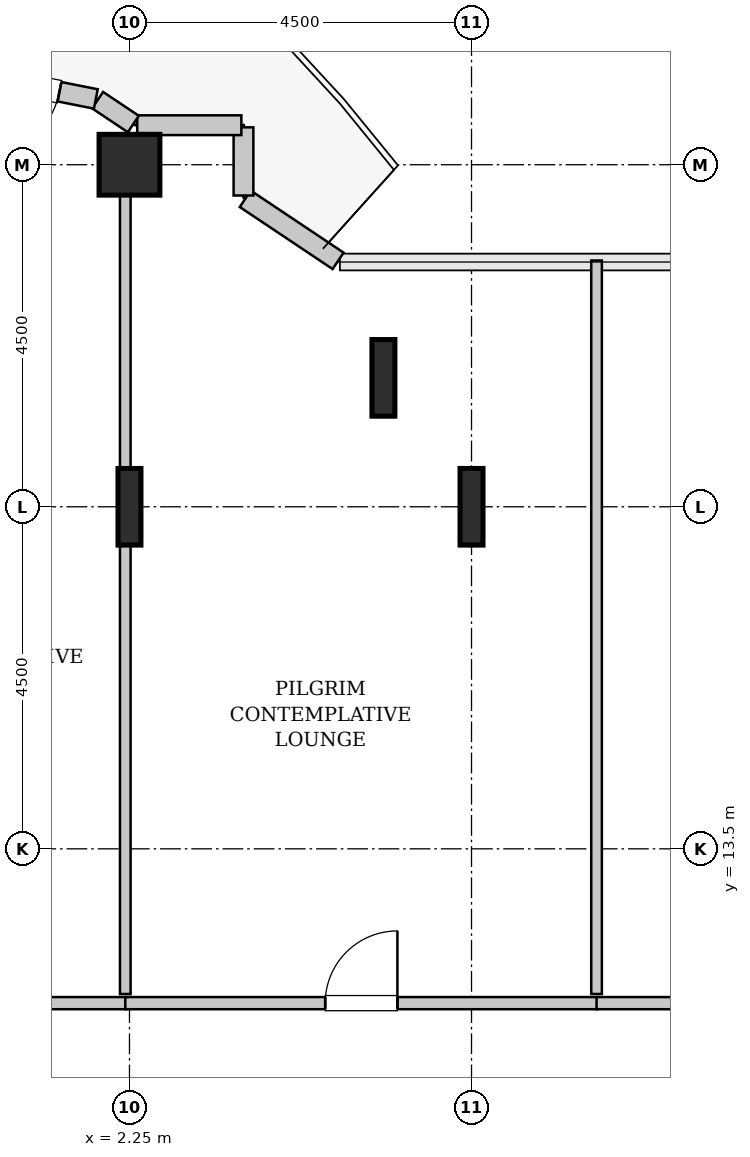
"""IFC4 building model, lengths in metres.
Left out: names, types, materials, properties, quantities, classifications, styles, units other than length and angle.
Written with IfcOpenShell. Run it as: python <this file> out.ifc"""

import sys

from ifc_helpers import new_model, si_unit, direction, frame, frame_2d, origin, origin_2d, place, context, subcontext, project, spatial, rectangle, hollow_rectangle, i_section, extrude, source, transform, mapped, element, fill, save


model = new_model("IFC4")
c1 = context("Model", 3, precision=1e-05, world=origin(), true_north=direction((0.0, 1.0)))
c2 = subcontext(c1, "Body", "Model", "MODEL_VIEW")
j1 = project(units=[si_unit("LENGTHUNIT", "METRE"), si_unit("PLANEANGLEUNIT", "RADIAN")], contexts=[c1])
p1 = place(None, origin())
s1 = spatial("IfcSite", under=j1, at=p1, CompositionType="ELEMENT")
p2 = place(p1, origin())
s2 = spatial("IfcBuilding", under=s1, at=p2, CompositionType="ELEMENT")
p3 = place(p2, frame((0.0, 0.0, 125.0)))
s3 = spatial("IfcBuildingStorey", under=s2, at=p3, CompositionType="ELEMENT", Elevation=125.0)
m1 = source(origin(), c2, "Body", "SweptSolid", [
    extrude(i_section(OverallWidth=0.302, OverallDepth=1.008, WebThickness=0.021, FlangeThickness=0.04, FilletRadius=0.03, at=origin_2d()), origin(), (0.0, 0.0, 1.0), 3.8),
])
p4 = place(p3, frame((2.25, 18.0, 0.0), z_axis=(0.0, 0.0, 1.0), x_axis=(1.0, 0.0, 0.0)))
e1 = element("IfcColumn", 1, at=p4, inside=s3, PredefinedType="COLUMN", context=c2, shape_type="MappedRepresentation", body=[
    mapped(m1, transform((0.0, 0.0, 0.0), x_axis=(1.0, 0.0, 0.0), y_axis=(0.0, 1.0, 0.0), z_axis=(0.0, 0.0, 1.0), scale=1.0)),
])
m2 = source(origin(), c2, "Body", "SweptSolid", [
    extrude(hollow_rectangle(XDim=0.8, YDim=0.8, WallThickness=0.04, InnerFilletRadius=0.04, OuterFilletRadius=0.08, at=origin_2d()), origin(), (0.0, 0.0, 1.0), 3.8),
])
p5 = place(p3, frame((2.25, 22.5, 0.0), z_axis=(0.0, 0.0, 1.0), x_axis=(1.0, 0.0, 0.0)))
e2 = element("IfcColumn", 2, at=p5, inside=s3, PredefinedType="COLUMN", context=c2, shape_type="MappedRepresentation", body=[
    mapped(m2, transform((0.0, 0.0, 0.0), x_axis=(1.0, 0.0, 0.0), y_axis=(0.0, 1.0, 0.0), z_axis=(0.0, 0.0, 1.0), scale=1.0)),
])
for number, where, z_axis, x_axis in (
    (3, (5.591, 19.696, 0.0), (0.0, 0.0, 1.0), (1.0, 0.0, 0.0)),
    (4, (6.75, 18.0, 0.0), (0.0, 0.0, 1.0), (1.0, 0.0, 0.0)),
):
    element("IfcColumn", number, at=place(p3, frame(where, z_axis=z_axis, x_axis=x_axis)), inside=s3, PredefinedType="COLUMN", context=c2, shape_type="MappedRepresentation", body=[
        mapped(m1, transform((0.0, 0.0, 0.0), x_axis=(1.0, 0.0, 0.0), y_axis=(0.0, 1.0, 0.0), z_axis=(0.0, 0.0, 1.0), scale=1.0)),
    ])
m3 = source(origin(), c2, "Body", "SweptSolid", [
    extrude(rectangle(XDim=1.469, YDim=0.26, at=frame_2d((0.734, 0.0))), origin(), (0.0, 0.0, 1.0), 3.55),
])
p6 = place(p3, frame((4.995, 21.236, 0.0), z_axis=(0.0, 0.0, 1.0), x_axis=(-0.831461760506, 0.555581983884, 0.0)))
e5 = element("IfcWall", 5, at=p6, inside=s3, PredefinedType="SOLIDWALL", context=c2, shape_type="MappedRepresentation", body=[
    mapped(m3, transform((0.0, 0.0, 0.0), x_axis=(1.0, 0.0, 0.0), y_axis=(0.0, 1.0, 0.0), z_axis=(0.0, 0.0, 1.0), scale=1.0)),
])
m4 = source(origin(), c2, "Body", "SweptSolid", [
    extrude(rectangle(XDim=0.897, YDim=0.26, at=frame_2d((0.448, 0.0))), origin(), (0.0, 0.0, 1.0), 3.55),
])
p7 = place(p3, frame((3.75, 22.095, 0.0), z_axis=(0.0, 0.0, 1.0), x_axis=(0.0, 1.0, 0.0)))
e6 = element("IfcWall", 6, at=p7, inside=s3, PredefinedType="SOLIDWALL", context=c2, shape_type="MappedRepresentation", body=[
    mapped(m4, transform((0.0, 0.0, 0.0), x_axis=(1.0, 0.0, 0.0), y_axis=(0.0, 1.0, 0.0), z_axis=(0.0, 0.0, 1.0), scale=1.0)),
])
m5 = source(origin(), c2, "Body", "SweptSolid", [
    extrude(rectangle(XDim=1.37, YDim=0.26, at=frame_2d((0.685, 0.0))), origin(), (0.0, 0.0, 1.0), 3.55),
])
p8 = place(p3, frame((3.722, 23.02, 0.0), z_axis=(0.0, 0.0, 1.0), x_axis=(-1.0, 0.0, 0.0)))
e7 = element("IfcWall", 7, at=p8, inside=s3, PredefinedType="SOLIDWALL", context=c2, shape_type="MappedRepresentation", body=[
    mapped(m5, transform((0.0, 0.0, 0.0), x_axis=(1.0, 0.0, 0.0), y_axis=(0.0, 1.0, 0.0), z_axis=(0.0, 0.0, 1.0), scale=1.0)),
])
m6 = source(origin(), c2, "Body", "SweptSolid", [
    extrude(rectangle(XDim=0.565, YDim=0.26, at=frame_2d((0.283, 0.0))), origin(), (0.0, 0.0, 1.0), 3.55),
])
p9 = place(p3, frame((2.301, 23.036, 0.0), z_axis=(0.0, 0.0, 1.0), x_axis=(-0.831651492666, 0.555297933317, 0.0)))
e8 = element("IfcWall", 8, at=p9, inside=s3, PredefinedType="SOLIDWALL", context=c2, shape_type="MappedRepresentation", body=[
    mapped(m6, transform((0.0, 0.0, 0.0), x_axis=(1.0, 0.0, 0.0), y_axis=(0.0, 1.0, 0.0), z_axis=(0.0, 0.0, 1.0), scale=1.0)),
])
m7 = source(origin(), c2, "Body", "SweptSolid", [
    extrude(rectangle(XDim=4.137, YDim=0.26, at=frame_2d((2.068, 0.0))), origin(), (0.0, 0.0, 1.0), 3.55),
])
p10 = place(p3, frame((1.807, 23.365, 0.0), z_axis=(0.0, 0.0, 1.0), x_axis=(-0.980782170794, 0.195105954428, 0.0)))
e9 = element("IfcWall", 9, at=p10, inside=s3, PredefinedType="SOLIDWALL", context=c2, shape_type="MappedRepresentation", body=[
    mapped(m7, transform((0.0, 0.0, 0.0), x_axis=(1.0, 0.0, 0.0), y_axis=(0.0, 1.0, 0.0), z_axis=(0.0, 0.0, 1.0), scale=1.0)),
])
p11 = place(p10, frame((0.488, 0.0, 0.0)))
e10 = element("IfcOpeningElement", 10, at=p11, cuts=e9, PredefinedType="OPENING", context=c2, shape_type="SweptSolid", body=[
    extrude(rectangle(XDim=1.1, YDim=2.2, at=frame_2d((0.55, 1.1))), frame((0.0, 0.14, 0.0), z_axis=(0.0, -1.0, 0.0), x_axis=(1.0, 0.0, 0.0)), (0.0, 0.0, 1.0), 0.28),
])
m8 = source(origin(), c2, "Body", "SweptSolid", [
    extrude(rectangle(XDim=3.605, YDim=0.16, at=frame_2d((1.802, 0.0))), origin(), (0.0, 0.0, 1.0), 3.535),
])
p12 = place(p3, frame((-1.4, 11.47, 0.0), z_axis=(0.0, 0.0, 1.0), x_axis=(1.0, 0.0, 0.0)))
e11 = element("IfcWall", 11, at=p12, inside=s3, PredefinedType="PARTITIONING", context=c2, shape_type="MappedRepresentation", body=[
    mapped(m8, transform((0.0, 0.0, 0.0), x_axis=(1.0, 0.0, 0.0), y_axis=(0.0, 1.0, 0.0), z_axis=(0.0, 0.0, 1.0), scale=1.0)),
])
p13 = place(p12, frame((1.327, 0.0, 0.0)))
e12 = element("IfcOpeningElement", 12, at=p13, cuts=e11, PredefinedType="OPENING", context=c2, shape_type="SweptSolid", body=[
    extrude(rectangle(XDim=0.95, YDim=2.1, at=frame_2d((0.475, 1.05))), frame((0.0, 0.09, 0.0), z_axis=(0.0, -1.0, 0.0), x_axis=(1.0, 0.0, 0.0)), (0.0, 0.0, 1.0), 0.18),
])
m9 = source(origin(), c2, "Body", "SweptSolid", [
    extrude(rectangle(XDim=11.314, YDim=0.14, at=frame_2d((5.657, 0.0))), origin(), (0.0, 0.0, 1.0), 2.875),
])
p14 = place(p3, frame((2.195, 11.59, 0.0), z_axis=(0.0, 0.0, 1.0), x_axis=(0.0, 1.0, 0.0)))
e13 = element("IfcWall", 13, at=p14, inside=s3, PredefinedType="PARTITIONING", context=c2, shape_type="MappedRepresentation", body=[
    mapped(m9, transform((0.0, 0.0, 0.0), x_axis=(1.0, 0.0, 0.0), y_axis=(0.0, 1.0, 0.0), z_axis=(0.0, 0.0, 1.0), scale=1.0)),
])
m10 = source(origin(), c2, "Body", "SweptSolid", [
    extrude(rectangle(XDim=6.21, YDim=0.16, at=frame_2d((3.105, 0.0))), origin(), (0.0, 0.0, 1.0), 3.535),
])
p15 = place(p3, frame((2.195, 11.47, 0.0), z_axis=(0.0, 0.0, 1.0), x_axis=(1.0, 0.0, 0.0)))
e14 = element("IfcWall", 14, at=p15, inside=s3, PredefinedType="PARTITIONING", context=c2, shape_type="MappedRepresentation", body=[
    mapped(m10, transform((0.0, 0.0, 0.0), x_axis=(1.0, 0.0, 0.0), y_axis=(0.0, 1.0, 0.0), z_axis=(0.0, 0.0, 1.0), scale=1.0)),
])
p16 = place(p15, frame((2.63, 0.0, 0.0)))
e15 = element("IfcOpeningElement", 15, at=p16, cuts=e14, PredefinedType="OPENING", context=c2, shape_type="SweptSolid", body=[
    extrude(rectangle(XDim=0.95, YDim=2.1, at=frame_2d((0.475, 1.05))), frame((0.0, 0.09, 0.0), z_axis=(0.0, -1.0, 0.0), x_axis=(1.0, 0.0, 0.0)), (0.0, 0.0, 1.0), 0.18),
])
m11 = source(origin(), c2, "Body", "SweptSolid", [
    extrude(rectangle(XDim=9.65, YDim=0.14, at=frame_2d((4.825, 0.0))), origin(), (0.0, 0.0, 1.0), 3.535),
])
p17 = place(p3, frame((8.395, 11.59, 0.0), z_axis=(0.0, 0.0, 1.0), x_axis=(0.0, 1.0, 0.0)))
e16 = element("IfcWall", 16, at=p17, inside=s3, PredefinedType="PARTITIONING", context=c2, shape_type="MappedRepresentation", body=[
    mapped(m11, transform((0.0, 0.0, 0.0), x_axis=(1.0, 0.0, 0.0), y_axis=(0.0, 1.0, 0.0), z_axis=(0.0, 0.0, 1.0), scale=1.0)),
])
m12 = source(origin(), c2, "Body", "SweptSolid", [
    extrude(rectangle(XDim=5.225, YDim=0.16, at=frame_2d((2.613, 0.0))), origin(), (0.0, 0.0, 1.0), 3.535),
])
p18 = place(p3, frame((8.395, 11.47, 0.0), z_axis=(0.0, 0.0, 1.0), x_axis=(1.0, 0.0, 0.0)))
e17 = element("IfcWall", 17, at=p18, inside=s3, PredefinedType="PARTITIONING", context=c2, shape_type="MappedRepresentation", body=[
    mapped(m12, transform((0.0, 0.0, 0.0), x_axis=(1.0, 0.0, 0.0), y_axis=(0.0, 1.0, 0.0), z_axis=(0.0, 0.0, 1.0), scale=1.0)),
])
p19 = place(p18, frame((2.137, 0.0, 0.0)))
e18 = element("IfcOpeningElement", 18, at=p19, cuts=e17, PredefinedType="OPENING", context=c2, shape_type="SweptSolid", body=[
    extrude(rectangle(XDim=0.95, YDim=2.1, at=frame_2d((0.475, 1.05))), frame((0.0, 0.09, 0.0), z_axis=(0.0, -1.0, 0.0), x_axis=(1.0, 0.0, 0.0)), (0.0, 0.0, 1.0), 0.18),
])
m13 = source(origin(), c2, "Body", "SweptSolid", [
    extrude(rectangle(XDim=1.1, YDim=2.2, at=frame_2d((0.55, 1.1))), frame((0.0, 0.025, 0.0), z_axis=(0.0, -1.0, 0.0), x_axis=(1.0, 0.0, 0.0)), (0.0, 0.0, 1.0), 0.05),
])
p20 = place(p11, origin())
e19 = element("IfcDoor", 19, at=p20, inside=s3, OperationType="SINGLE_SWING_RIGHT", PredefinedType="DOOR", context=c2, shape_type="MappedRepresentation", body=[
    mapped(m13, transform((0.0, 0.0, 0.0), x_axis=(1.0, 0.0, 0.0), y_axis=(0.0, 1.0, 0.0), z_axis=(0.0, 0.0, 1.0), scale=1.0)),
])
fill(e10, e19)
m14 = source(origin(), c2, "Body", "SweptSolid", [
    extrude(rectangle(XDim=0.95, YDim=2.1, at=frame_2d((0.475, 1.05))), frame((0.0, 0.025, 0.0), z_axis=(0.0, -1.0, 0.0), x_axis=(1.0, 0.0, 0.0)), (0.0, 0.0, 1.0), 0.05),
])
p21 = place(p16, origin())
e20 = element("IfcDoor", 20, at=p21, inside=s3, OperationType="SINGLE_SWING_RIGHT", PredefinedType="DOOR", context=c2, shape_type="MappedRepresentation", body=[
    mapped(m14, transform((0.0, 0.0, 0.0), x_axis=(1.0, 0.0, 0.0), y_axis=(0.0, 1.0, 0.0), z_axis=(0.0, 0.0, 1.0), scale=1.0)),
])
fill(e15, e20)
save(model, sys.argv[1])
